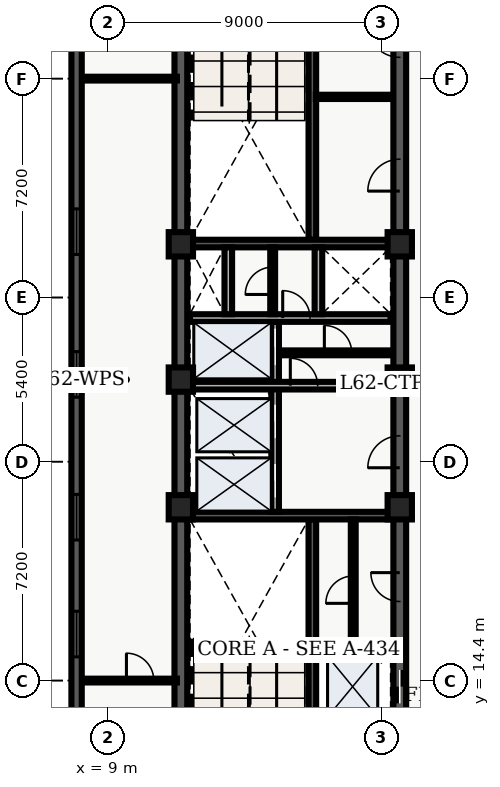
"""IFC4 building model, lengths in metres.
Left out: names, types, materials, properties, quantities, classifications, styles, units other than length and angle.
Written with IfcOpenShell. Run it as: python <this file> out.ifc"""

import sys

from ifc_helpers import new_model, entity, si_unit, converted_unit, direction, frame, origin_with_axes, origin_2d_with_axis, place, context, subcontext, project, spatial, polyline, rectangle, outline, extrude, element, fill, save


model = new_model("IFC4")
c1 = context("Model", 3, precision=1e-05, world=origin_with_axes(), true_north=direction((0.0, 1.0)))
c2 = subcontext(c1, "Body", "Model", "MODEL_VIEW")
j1 = project(units=[si_unit("LENGTHUNIT", "METRE"), converted_unit("PLANEANGLEUNIT", "DEGREE", entity("IfcPlaneAngleMeasure", 0.017), si_unit("PLANEANGLEUNIT", "RADIAN"), dimensions=[0, 0, 0, 0, 0, 0, 0])], contexts=[c1])
p1 = place(None, origin_with_axes())
s1 = spatial("IfcSite", under=j1, at=p1, CompositionType="ELEMENT")
p2 = place(p1, origin_with_axes())
s2 = spatial("IfcBuilding", under=s1, at=p2, CompositionType="ELEMENT")
p3 = place(p2, frame((0.0, 0.0, 252.9), z_axis=(0.0, 0.0, 1.0), x_axis=(1.0, 0.0, 0.0)))
s3 = spatial("IfcBuildingStorey", under=s2, at=p3, CompositionType="ELEMENT", Elevation=252.9)
p4 = place(p3, frame((11.4, 10.8, 0.0), z_axis=(0.0, 0.0, 1.0), x_axis=(0.0, 1.0, 0.0)))
e1 = element("IfcWall", 1, at=p4, inside=s3, PredefinedType="SHEAR", context=c2, shape_type="SweptSolid", body=[
    extrude(outline(polyline([(0.0, -0.21), (27.0, -0.21), (27.0, 0.21), (0.0, 0.21), (0.0, -0.21)])), origin_with_axes(), (0.0, 0.0, 1.0), 3.66),
])
p5 = place(p3, frame((18.6, 10.8, 0.0), z_axis=(0.0, 0.0, 1.0), x_axis=(0.0, 1.0, 0.0)))
e2 = element("IfcWall", 2, at=p5, inside=s3, PredefinedType="SHEAR", context=c2, shape_type="SweptSolid", body=[
    extrude(outline(polyline([(0.0, -0.21), (13.5, -0.21), (13.5, 0.21), (0.0, 0.21), (0.0, -0.21)])), origin_with_axes(), (0.0, 0.0, 1.0), 3.66),
])
p6 = place(p5, frame((1.3, 0.0, 0.0), z_axis=(0.0, 0.0, 1.0), x_axis=(1.0, 0.0, 0.0)))
e3 = element("IfcOpeningElement", 3, at=p6, cuts=e2, PredefinedType="OPENING", context=c2, shape_type="SweptSolid", body=[
    extrude(rectangle(XDim=1.1, YDim=0.44, at=origin_2d_with_axis()), origin_with_axes(), (0.0, 0.0, 1.0), 2.15),
])
p7 = place(p5, frame((3.4, 0.0, 0.0), z_axis=(0.0, 0.0, 1.0), x_axis=(1.0, 0.0, 0.0)))
e4 = element("IfcOpeningElement", 4, at=p7, cuts=e2, PredefinedType="OPENING", context=c2, shape_type="SweptSolid", body=[
    extrude(rectangle(XDim=1.1, YDim=0.44, at=origin_2d_with_axis()), origin_with_axes(), (0.0, 0.0, 1.0), 2.15),
])
p8 = place(p5, frame((11.125, 0.0, 0.0), z_axis=(0.0, 0.0, 1.0), x_axis=(1.0, 0.0, 0.0)))
e5 = element("IfcOpeningElement", 5, at=p8, cuts=e2, PredefinedType="OPENING", context=c2, shape_type="SweptSolid", body=[
    extrude(rectangle(XDim=1.05, YDim=0.44, at=origin_2d_with_axis()), origin_with_axes(), (0.0, 0.0, 1.0), 2.15),
])
p9 = place(p5, frame((6.675, 0.0, 0.0), z_axis=(0.0, 0.0, 1.0), x_axis=(1.0, 0.0, 0.0)))
e6 = element("IfcOpeningElement", 6, at=p9, cuts=e2, PredefinedType="OPENING", context=c2, shape_type="SweptSolid", body=[
    extrude(rectangle(XDim=0.95, YDim=0.44, at=origin_2d_with_axis()), origin_with_axes(), (0.0, 0.0, 1.0), 2.15),
])
p10 = place(p3, frame((18.6, 24.3, 0.0), z_axis=(0.0, 0.0, 1.0), x_axis=(0.0, 1.0, 0.0)))
e7 = element("IfcWall", 7, at=p10, inside=s3, PredefinedType="SHEAR", context=c2, shape_type="SweptSolid", body=[
    extrude(outline(polyline([(0.0, -0.21), (13.5, -0.21), (13.5, 0.21), (0.0, 0.21), (0.0, -0.21)])), origin_with_axes(), (0.0, 0.0, 1.0), 3.66),
])
p11 = place(p10, frame((6.725, 0.0, 0.0), z_axis=(0.0, 0.0, 1.0), x_axis=(1.0, 0.0, 0.0)))
e8 = element("IfcOpeningElement", 8, at=p11, cuts=e7, PredefinedType="OPENING", context=c2, shape_type="SweptSolid", body=[
    extrude(rectangle(XDim=1.05, YDim=0.44, at=origin_2d_with_axis()), origin_with_axes(), (0.0, 0.0, 1.0), 2.15),
])
p12 = place(p10, frame((11.125, 0.0, 0.0), z_axis=(0.0, 0.0, 1.0), x_axis=(1.0, 0.0, 0.0)))
e9 = element("IfcOpeningElement", 9, at=p12, cuts=e7, PredefinedType="OPENING", context=c2, shape_type="SweptSolid", body=[
    extrude(rectangle(XDim=1.05, YDim=0.44, at=origin_2d_with_axis()), origin_with_axes(), (0.0, 0.0, 1.0), 2.15),
])
p13 = place(p3, frame((15.725, 11.01, 0.0), z_axis=(0.0, 0.0, 1.0), x_axis=(0.0, 1.0, 0.0)))
e10 = element("IfcWall", 10, at=p13, inside=s3, PredefinedType="SHEAR", context=c2, shape_type="SweptSolid", body=[
    extrude(outline(polyline([(0.0, -0.125), (8.69, -0.125), (8.69, 0.125), (0.0, 0.125), (0.0, -0.125)])), origin_with_axes(), (0.0, 0.0, 1.0), 3.66),
])
p14 = place(p3, frame((11.61, 19.825, 0.0), z_axis=(0.0, 0.0, 1.0), x_axis=(1.0, 0.0, 0.0)))
e11 = element("IfcWall", 11, at=p14, inside=s3, PredefinedType="SHEAR", context=c2, shape_type="SweptSolid", body=[
    extrude(outline(polyline([(0.0, -0.125), (6.78, -0.125), (6.78, 0.125), (0.0, 0.125), (0.0, -0.125)])), origin_with_axes(), (0.0, 0.0, 1.0), 3.66),
])
p15 = place(p3, frame((15.725, 28.9, 0.0), z_axis=(0.0, 0.0, 1.0), x_axis=(0.0, 1.0, 0.0)))
e12 = element("IfcWall", 12, at=p15, inside=s3, PredefinedType="SHEAR", context=c2, shape_type="SweptSolid", body=[
    extrude(outline(polyline([(0.0, -0.125), (8.69, -0.125), (8.69, 0.125), (0.0, 0.125), (0.0, -0.125)])), origin_with_axes(), (0.0, 0.0, 1.0), 3.66),
])
p16 = place(p3, frame((11.61, 28.775, 0.0), z_axis=(0.0, 0.0, 1.0), x_axis=(1.0, 0.0, 0.0)))
e13 = element("IfcWall", 13, at=p16, inside=s3, PredefinedType="SHEAR", context=c2, shape_type="SweptSolid", body=[
    extrude(outline(polyline([(0.0, -0.125), (6.78, -0.125), (6.78, 0.125), (0.0, 0.125), (0.0, -0.125)])), origin_with_axes(), (0.0, 0.0, 1.0), 3.66),
])
p17 = place(p3, frame((14.5, 19.95, 0.0), z_axis=(0.0, 0.0, 1.0), x_axis=(0.0, 1.0, 0.0)))
e14 = element("IfcWall", 14, at=p17, inside=s3, PredefinedType="SOLIDWALL", context=c2, shape_type="SweptSolid", body=[
    extrude(outline(polyline([(0.0, -0.125), (6.25, -0.125), (6.25, 0.125), (0.0, 0.125), (0.0, -0.125)])), origin_with_axes(), (0.0, 0.0, 1.0), 2.7),
])
p18 = place(p17, frame((1.025, 0.0, 0.0), z_axis=(0.0, 0.0, 1.0), x_axis=(1.0, 0.0, 0.0)))
e15 = element("IfcOpeningElement", 15, at=p18, cuts=e14, PredefinedType="OPENING", context=c2, shape_type="SweptSolid", body=[
    extrude(rectangle(XDim=1.1, YDim=0.27, at=origin_2d_with_axis()), origin_with_axes(), (0.0, 0.0, 1.0), 2.15),
])
p19 = place(p17, frame((2.975, 0.0, 0.0), z_axis=(0.0, 0.0, 1.0), x_axis=(1.0, 0.0, 0.0)))
e16 = element("IfcOpeningElement", 16, at=p19, cuts=e14, PredefinedType="OPENING", context=c2, shape_type="SweptSolid", body=[
    extrude(rectangle(XDim=1.1, YDim=0.27, at=origin_2d_with_axis()), origin_with_axes(), (0.0, 0.0, 1.0), 2.15),
])
p20 = place(p17, frame((5.425, 0.0, 0.0), z_axis=(0.0, 0.0, 1.0), x_axis=(1.0, 0.0, 0.0)))
e17 = element("IfcOpeningElement", 17, at=p20, cuts=e14, PredefinedType="OPENING", context=c2, shape_type="SweptSolid", body=[
    extrude(rectangle(XDim=1.2, YDim=0.27, at=origin_2d_with_axis()), origin_with_axes(), (0.0, 0.0, 1.0), 2.15),
])
p21 = place(p3, frame((11.7, 24.1, 0.0), z_axis=(0.0, 0.0, 1.0), x_axis=(1.0, 0.0, 0.0)))
e18 = element("IfcWall", 18, at=p21, inside=s3, PredefinedType="SOLIDWALL", context=c2, shape_type="SweptSolid", body=[
    extrude(outline(polyline([(0.0, -0.125), (6.6, -0.125), (6.6, 0.125), (0.0, 0.125), (0.0, -0.125)])), origin_with_axes(), (0.0, 0.0, 1.0), 2.7),
])
p22 = place(p21, frame((3.75, 0.0, 0.0), z_axis=(0.0, 0.0, 1.0), x_axis=(1.0, 0.0, 0.0)))
e19 = element("IfcOpeningElement", 19, at=p22, cuts=e18, PredefinedType="OPENING", context=c2, shape_type="SweptSolid", body=[
    extrude(rectangle(XDim=0.9, YDim=0.27, at=origin_2d_with_axis()), origin_with_axes(), (0.0, 0.0, 1.0), 2.15),
])
p23 = place(p3, frame((11.7, 26.325, 0.0), z_axis=(0.0, 0.0, 1.0), x_axis=(1.0, 0.0, 0.0)))
e20 = element("IfcWall", 20, at=p23, inside=s3, PredefinedType="SOLIDWALL", context=c2, shape_type="SweptSolid", body=[
    extrude(outline(polyline([(0.0, -0.125), (6.6, -0.125), (6.6, 0.125), (0.0, 0.125), (0.0, -0.125)])), origin_with_axes(), (0.0, 0.0, 1.0), 2.7),
])
p24 = place(p23, frame((3.5, 0.0, 0.0), z_axis=(0.0, 0.0, 1.0), x_axis=(1.0, 0.0, 0.0)))
e21 = element("IfcOpeningElement", 21, at=p24, cuts=e20, PredefinedType="OPENING", context=c2, shape_type="SweptSolid", body=[
    extrude(rectangle(XDim=0.9, YDim=0.27, at=origin_2d_with_axis()), origin_with_axes(), (0.0, 0.0, 1.0), 2.15),
])
for number, where, z_axis, x_axis in (
    (22, (12.96, 26.45, 0.0), (0.0, 0.0, 1.0), (0.0, 1.0, 0.0)),
    (23, (15.925, 26.45, 0.0), (0.0, 0.0, 1.0), (0.0, 1.0, 0.0)),
):
    element("IfcWall", number, at=place(p3, frame(where, z_axis=z_axis, x_axis=x_axis)), inside=s3, PredefinedType="SOLIDWALL", context=c2, shape_type="SweptSolid", body=[
        extrude(outline(polyline([(0.0, -0.125), (2.2, -0.125), (2.2, 0.125), (0.0, 0.125), (0.0, -0.125)])), origin_with_axes(), (0.0, 0.0, 1.0), 2.7),
    ])
for number, where, z_axis, x_axis in (
    (24, (11.4, 20.1, 0.0), (0.0, 0.0, 1.0), (1.0, 0.0, 0.0)),
    (25, (11.4, 24.3, 0.0), (0.0, 0.0, 1.0), (1.0, 0.0, 0.0)),
    (26, (11.4, 28.75, 0.0), (0.0, 0.0, 1.0), (1.0, 0.0, 0.0)),
    (27, (18.6, 20.1, 0.0), (0.0, 0.0, 1.0), (1.0, 0.0, 0.0)),
    (28, (18.6, 24.3, 0.0), (0.0, 0.0, 1.0), (1.0, 0.0, 0.0)),
    (29, (18.6, 28.75, 0.0), (0.0, 0.0, 1.0), (1.0, 0.0, 0.0)),
):
    element("IfcColumn", number, at=place(p3, frame(where, z_axis=z_axis, x_axis=x_axis)), inside=s3, PredefinedType="COLUMN", context=c2, shape_type="SweptSolid", body=[
        extrude(rectangle(XDim=0.8, YDim=0.8, at=origin_2d_with_axis()), origin_with_axes(), (0.0, 0.0, 1.0), 3.9),
    ])
p25 = place(p3, frame((14.62, 25.18, 0.0), z_axis=(0.0, 0.0, 1.0), x_axis=(1.0, 0.0, 0.0)))
e30 = element("IfcWall", 30, at=p25, inside=s3, PredefinedType="PARTITIONING", context=c2, shape_type="SweptSolid", body=[
    extrude(outline(polyline([(0.0, -0.08), (3.68, -0.08), (3.68, 0.08), (0.0, 0.08), (0.0, -0.08)])), origin_with_axes(), (0.0, 0.0, 1.0), 2.7),
])
p26 = place(p25, frame((1.95, 0.0, 0.0), z_axis=(0.0, 0.0, 1.0), x_axis=(1.0, 0.0, 0.0)))
e31 = element("IfcOpeningElement", 31, at=p26, cuts=e30, PredefinedType="OPENING", context=c2, shape_type="SweptSolid", body=[
    extrude(rectangle(XDim=0.9, YDim=0.18, at=origin_2d_with_axis()), origin_with_axes(), (0.0, 0.0, 1.0), 2.15),
])
p27 = place(p3, frame((14.42, 26.45, 0.0), z_axis=(0.0, 0.0, 1.0), x_axis=(0.0, 1.0, 0.0)))
e32 = element("IfcWall", 32, at=p27, inside=s3, PredefinedType="PARTITIONING", context=c2, shape_type="SweptSolid", body=[
    extrude(outline(polyline([(0.0, -0.08), (2.2, -0.08), (2.2, 0.08), (0.0, 0.08), (0.0, -0.08)])), origin_with_axes(), (0.0, 0.0, 1.0), 2.7),
])
p28 = place(p27, frame((1.1, 0.0, 0.0), z_axis=(0.0, 0.0, 1.0), x_axis=(1.0, 0.0, 0.0)))
e33 = element("IfcOpeningElement", 33, at=p28, cuts=e32, PredefinedType="OPENING", context=c2, shape_type="SweptSolid", body=[
    extrude(rectangle(XDim=0.9, YDim=0.18, at=origin_2d_with_axis()), origin_with_axes(), (0.0, 0.0, 1.0), 2.15),
])
p29 = place(p3, frame((15.84, 15.27, 0.0), z_axis=(0.0, 0.0, 1.0), x_axis=(1.0, 0.0, 0.0)))
e34 = element("IfcWall", 34, at=p29, inside=s3, PredefinedType="SOLIDWALL", context=c2, shape_type="SweptSolid", body=[
    extrude(outline(polyline([(0.0, -0.125), (2.46, -0.125), (2.46, 0.125), (0.0, 0.125), (0.0, -0.125)])), origin_with_axes(), (0.0, 0.0, 1.0), 2.7),
])
p30 = place(p3, frame((17.07, 15.34, 0.0), z_axis=(0.0, 0.0, 1.0), x_axis=(0.0, 1.0, 0.0)))
e35 = element("IfcWall", 35, at=p30, inside=s3, PredefinedType="PARTITIONING", context=c2, shape_type="SweptSolid", body=[
    extrude(outline(polyline([(0.0, -0.08), (4.36, -0.08), (4.36, 0.08), (0.0, 0.08), (0.0, -0.08)])), origin_with_axes(), (0.0, 0.0, 1.0), 2.7),
])
p31 = place(p30, frame((2.05, 0.0, 0.0), z_axis=(0.0, 0.0, 1.0), x_axis=(1.0, 0.0, 0.0)))
e36 = element("IfcOpeningElement", 36, at=p31, cuts=e35, PredefinedType="OPENING", context=c2, shape_type="SweptSolid", body=[
    extrude(rectangle(XDim=0.9, YDim=0.18, at=origin_2d_with_axis()), origin_with_axes(), (0.0, 0.0, 1.0), 2.15),
])
p32 = place(p3, frame((15.84, 33.6, 0.0), z_axis=(0.0, 0.0, 1.0), x_axis=(1.0, 0.0, 0.0)))
e37 = element("IfcWall", 37, at=p32, inside=s3, PredefinedType="PARTITIONING", context=c2, shape_type="SweptSolid", body=[
    extrude(outline(polyline([(0.0, -0.07), (2.46, -0.07), (2.46, 0.07), (0.0, 0.07), (0.0, -0.07)])), origin_with_axes(), (0.0, 0.0, 1.0), 2.7),
])
p33 = place(p3, frame((8.135, 14.4, 0.0), z_axis=(0.0, 0.0, 1.0), x_axis=(1.0, 0.0, 0.0)))
e38 = element("IfcWall", 38, at=p33, inside=s3, PredefinedType="PARTITIONING", context=c2, shape_type="SweptSolid", body=[
    extrude(outline(polyline([(0.0, -0.062), (3.135, -0.062), (3.135, 0.062), (0.0, 0.062), (0.0, -0.062)])), origin_with_axes(), (0.0, 0.0, 1.0), 2.7),
])
p34 = place(p33, frame((1.925, 0.0, 0.0), z_axis=(0.0, 0.0, 1.0), x_axis=(1.0, 0.0, 0.0)))
e39 = element("IfcOpeningElement", 39, at=p34, cuts=e38, PredefinedType="OPENING", context=c2, shape_type="SweptSolid", body=[
    extrude(rectangle(XDim=0.9, YDim=0.145, at=origin_2d_with_axis()), origin_with_axes(), (0.0, 0.0, 1.0), 2.15),
])
p35 = place(p3, frame((8.135, 34.2, 0.0), z_axis=(0.0, 0.0, 1.0), x_axis=(1.0, 0.0, 0.0)))
e40 = element("IfcWall", 40, at=p35, inside=s3, PredefinedType="PARTITIONING", context=c2, shape_type="SweptSolid", body=[
    extrude(outline(polyline([(0.0, -0.062), (3.135, -0.062), (3.135, 0.062), (0.0, 0.062), (0.0, -0.062)])), origin_with_axes(), (0.0, 0.0, 1.0), 2.7),
])
p36 = place(p3, frame((7.97, 2.74, 0.0), z_axis=(0.0, 0.0, 1.0), x_axis=(0.0, 1.0, 0.0)))
e41 = element("IfcWall", 41, at=p36, inside=s3, PredefinedType="SOLIDWALL", context=c2, shape_type="SweptSolid", body=[
    extrude(outline(polyline([(0.0, -0.17), (43.46, -0.17), (43.46, 0.17), (0.0, 0.17), (0.0, -0.17)])), origin_with_axes(), (0.0, 0.0, 1.0), 3.66),
])
p37 = place(p36, frame((2.948, 0.0, 0.45), z_axis=(0.0, 0.0, 1.0), x_axis=(1.0, 0.0, 0.0)))
e42 = element("IfcOpeningElement", 42, at=p37, cuts=e41, PredefinedType="OPENING", context=c2, shape_type="SweptSolid", body=[
    extrude(rectangle(XDim=1.5, YDim=0.36, at=origin_2d_with_axis()), origin_with_axes(), (0.0, 0.0, 1.0), 2.1),
])
p38 = place(p36, frame((7.643, 0.0, 0.45), z_axis=(0.0, 0.0, 1.0), x_axis=(1.0, 0.0, 0.0)))
e43 = element("IfcOpeningElement", 43, at=p38, cuts=e41, PredefinedType="OPENING", context=c2, shape_type="SweptSolid", body=[
    extrude(rectangle(XDim=1.5, YDim=0.36, at=origin_2d_with_axis()), origin_with_axes(), (0.0, 0.0, 1.0), 2.1),
])
p39 = place(p36, frame((13.189, 0.0, 0.45), z_axis=(0.0, 0.0, 1.0), x_axis=(1.0, 0.0, 0.0)))
e44 = element("IfcOpeningElement", 44, at=p39, cuts=e41, PredefinedType="OPENING", context=c2, shape_type="SweptSolid", body=[
    extrude(rectangle(XDim=1.5, YDim=0.36, at=origin_2d_with_axis()), origin_with_axes(), (0.0, 0.0, 1.0), 2.1),
])
p40 = place(p36, frame((17.034, 0.0, 0.45), z_axis=(0.0, 0.0, 1.0), x_axis=(1.0, 0.0, 0.0)))
e45 = element("IfcOpeningElement", 45, at=p40, cuts=e41, PredefinedType="OPENING", context=c2, shape_type="SweptSolid", body=[
    extrude(rectangle(XDim=1.5, YDim=0.36, at=origin_2d_with_axis()), origin_with_axes(), (0.0, 0.0, 1.0), 2.1),
])
p41 = place(p36, frame((21.73, 0.0, 0.45), z_axis=(0.0, 0.0, 1.0), x_axis=(1.0, 0.0, 0.0)))
e46 = element("IfcOpeningElement", 46, at=p41, cuts=e41, PredefinedType="OPENING", context=c2, shape_type="SweptSolid", body=[
    extrude(rectangle(XDim=1.5, YDim=0.36, at=origin_2d_with_axis()), origin_with_axes(), (0.0, 0.0, 1.0), 2.1),
])
p42 = place(p36, frame((26.426, 0.0, 0.45), z_axis=(0.0, 0.0, 1.0), x_axis=(1.0, 0.0, 0.0)))
e47 = element("IfcOpeningElement", 47, at=p42, cuts=e41, PredefinedType="OPENING", context=c2, shape_type="SweptSolid", body=[
    extrude(rectangle(XDim=1.5, YDim=0.36, at=origin_2d_with_axis()), origin_with_axes(), (0.0, 0.0, 1.0), 2.1),
])
p43 = place(p36, frame((35.817, 0.0, 0.45), z_axis=(0.0, 0.0, 1.0), x_axis=(1.0, 0.0, 0.0)))
e48 = element("IfcOpeningElement", 48, at=p43, cuts=e41, PredefinedType="OPENING", context=c2, shape_type="SweptSolid", body=[
    extrude(rectangle(XDim=1.5, YDim=0.36, at=origin_2d_with_axis()), origin_with_axes(), (0.0, 0.0, 1.0), 2.1),
])
p44 = place(p36, frame((40.512, 0.0, 0.45), z_axis=(0.0, 0.0, 1.0), x_axis=(1.0, 0.0, 0.0)))
e49 = element("IfcOpeningElement", 49, at=p44, cuts=e41, PredefinedType="OPENING", context=c2, shape_type="SweptSolid", body=[
    extrude(rectangle(XDim=1.5, YDim=0.36, at=origin_2d_with_axis()), origin_with_axes(), (0.0, 0.0, 1.0), 2.1),
])
p45 = place(p5, frame((3.4, 0.0, 0.0), z_axis=(0.0, 0.0, 1.0), x_axis=(1.0, 0.0, 0.0)))
e50 = element("IfcDoor", 50, at=p45, inside=s3, OperationType="SLIDING_TO_RIGHT", PredefinedType="DOOR", context=c2, shape_type="SweptSolid", body=[
    extrude(rectangle(XDim=1.1, YDim=0.09, at=origin_2d_with_axis()), origin_with_axes(), (0.0, 0.0, 1.0), 2.15),
])
fill(e4, e50)
p46 = place(p17, frame((1.025, 0.0, 0.0), z_axis=(0.0, 0.0, 1.0), x_axis=(1.0, 0.0, 0.0)))
e51 = element("IfcDoor", 51, at=p46, inside=s3, OperationType="SLIDING_TO_LEFT", PredefinedType="DOOR", context=c2, shape_type="SweptSolid", body=[
    extrude(rectangle(XDim=1.1, YDim=0.09, at=origin_2d_with_axis()), origin_with_axes(), (0.0, 0.0, 1.0), 2.15),
])
fill(e15, e51)
p47 = place(p17, frame((2.975, 0.0, 0.0), z_axis=(0.0, 0.0, 1.0), x_axis=(1.0, 0.0, 0.0)))
e52 = element("IfcDoor", 52, at=p47, inside=s3, OperationType="SLIDING_TO_RIGHT", PredefinedType="DOOR", context=c2, shape_type="SweptSolid", body=[
    extrude(rectangle(XDim=1.1, YDim=0.09, at=origin_2d_with_axis()), origin_with_axes(), (0.0, 0.0, 1.0), 2.15),
])
fill(e16, e52)
p48 = place(p17, frame((5.425, 0.0, 0.0), z_axis=(0.0, 0.0, 1.0), x_axis=(1.0, 0.0, 0.0)))
e53 = element("IfcDoor", 53, at=p48, inside=s3, OperationType="DOUBLE_DOOR_SLIDING", PredefinedType="DOOR", context=c2, shape_type="SweptSolid", body=[
    extrude(rectangle(XDim=1.2, YDim=0.09, at=origin_2d_with_axis()), origin_with_axes(), (0.0, 0.0, 1.0), 2.15),
])
fill(e17, e53)
p49 = place(p5, frame((11.125, 0.0, 0.0), z_axis=(0.0, 0.0, 1.0), x_axis=(1.0, 0.0, 0.0)))
e54 = element("IfcDoor", 54, at=p49, inside=s3, OperationType="SINGLE_SWING_LEFT", PredefinedType="DOOR", context=c2, shape_type="SweptSolid", body=[
    extrude(rectangle(XDim=1.05, YDim=0.09, at=origin_2d_with_axis()), origin_with_axes(), (0.0, 0.0, 1.0), 2.15),
])
fill(e5, e54)
p50 = place(p23, frame((3.5, 0.0, 0.0), z_axis=(0.0, 0.0, 1.0), x_axis=(1.0, 0.0, 0.0)))
e55 = element("IfcDoor", 55, at=p50, inside=s3, OperationType="SINGLE_SWING_LEFT", PredefinedType="DOOR", context=c2, shape_type="SweptSolid", body=[
    extrude(rectangle(XDim=0.9, YDim=0.09, at=origin_2d_with_axis()), origin_with_axes(), (0.0, 0.0, 1.0), 2.15),
])
fill(e21, e55)
p51 = place(p27, frame((1.1, 0.0, 0.0), z_axis=(0.0, 0.0, 1.0), x_axis=(1.0, 0.0, 0.0)))
e56 = element("IfcDoor", 56, at=p51, inside=s3, OperationType="SINGLE_SWING_LEFT", PredefinedType="DOOR", context=c2, shape_type="SweptSolid", body=[
    extrude(rectangle(XDim=0.9, YDim=0.09, at=origin_2d_with_axis()), origin_with_axes(), (0.0, 0.0, 1.0), 2.15),
])
fill(e33, e56)
p52 = place(p21, frame((3.75, 0.0, 0.0), z_axis=(0.0, 0.0, 1.0), x_axis=(1.0, 0.0, 0.0)))
e57 = element("IfcDoor", 57, at=p52, inside=s3, OperationType="SINGLE_SWING_LEFT", PredefinedType="DOOR", context=c2, shape_type="SweptSolid", body=[
    extrude(rectangle(XDim=0.9, YDim=0.09, at=origin_2d_with_axis()), origin_with_axes(), (0.0, 0.0, 1.0), 2.15),
])
fill(e19, e57)
p53 = place(p25, frame((1.95, 0.0, 0.0), z_axis=(0.0, 0.0, 1.0), x_axis=(1.0, 0.0, 0.0)))
e58 = element("IfcDoor", 58, at=p53, inside=s3, OperationType="SINGLE_SWING_LEFT", PredefinedType="DOOR", context=c2, shape_type="SweptSolid", body=[
    extrude(rectangle(XDim=0.9, YDim=0.09, at=origin_2d_with_axis()), origin_with_axes(), (0.0, 0.0, 1.0), 2.15),
])
fill(e31, e58)
p54 = place(p30, frame((2.05, 0.0, 0.0), z_axis=(0.0, 0.0, 1.0), x_axis=(1.0, 0.0, 0.0)))
e59 = element("IfcDoor", 59, at=p54, inside=s3, OperationType="SINGLE_SWING_LEFT", PredefinedType="DOOR", context=c2, shape_type="SweptSolid", body=[
    extrude(rectangle(XDim=0.9, YDim=0.09, at=origin_2d_with_axis()), origin_with_axes(), (0.0, 0.0, 1.0), 2.15),
])
fill(e36, e59)
p55 = place(p5, frame((6.675, 0.0, 0.0), z_axis=(0.0, 0.0, 1.0), x_axis=(1.0, 0.0, 0.0)))
e60 = element("IfcDoor", 60, at=p55, inside=s3, OperationType="SINGLE_SWING_RIGHT", PredefinedType="DOOR", context=c2, shape_type="SweptSolid", body=[
    extrude(rectangle(XDim=0.95, YDim=0.09, at=origin_2d_with_axis()), origin_with_axes(), (0.0, 0.0, 1.0), 2.15),
])
fill(e6, e60)
p56 = place(p10, frame((6.725, 0.0, 0.0), z_axis=(0.0, 0.0, 1.0), x_axis=(1.0, 0.0, 0.0)))
e61 = element("IfcDoor", 61, at=p56, inside=s3, OperationType="SINGLE_SWING_LEFT", PredefinedType="DOOR", context=c2, shape_type="SweptSolid", body=[
    extrude(rectangle(XDim=1.05, YDim=0.09, at=origin_2d_with_axis()), origin_with_axes(), (0.0, 0.0, 1.0), 2.15),
])
fill(e8, e61)
p57 = place(p10, frame((11.125, 0.0, 0.0), z_axis=(0.0, 0.0, 1.0), x_axis=(1.0, 0.0, 0.0)))
e62 = element("IfcDoor", 62, at=p57, inside=s3, OperationType="SINGLE_SWING_RIGHT", PredefinedType="DOOR", context=c2, shape_type="SweptSolid", body=[
    extrude(rectangle(XDim=1.05, YDim=0.09, at=origin_2d_with_axis()), origin_with_axes(), (0.0, 0.0, 1.0), 2.15),
])
fill(e9, e62)
p58 = place(p33, frame((1.925, 0.0, 0.0), z_axis=(0.0, 0.0, 1.0), x_axis=(1.0, 0.0, 0.0)))
e63 = element("IfcDoor", 63, at=p58, inside=s3, OperationType="SINGLE_SWING_LEFT", PredefinedType="DOOR", context=c2, shape_type="SweptSolid", body=[
    extrude(rectangle(XDim=0.9, YDim=0.075, at=origin_2d_with_axis()), origin_with_axes(), (0.0, 0.0, 1.0), 2.15),
])
fill(e39, e63)
p59 = place(p36, frame((13.189, 0.0, 0.45), z_axis=(0.0, 0.0, 1.0), x_axis=(1.0, 0.0, 0.0)))
e64 = element("IfcWindow", 64, at=p59, inside=s3, PredefinedType="WINDOW", context=c2, shape_type="SweptSolid", body=[
    extrude(rectangle(XDim=1.5, YDim=0.09, at=origin_2d_with_axis()), origin_with_axes(), (0.0, 0.0, 1.0), 2.1),
])
fill(e44, e64)
p60 = place(p36, frame((17.034, 0.0, 0.45), z_axis=(0.0, 0.0, 1.0), x_axis=(1.0, 0.0, 0.0)))
e65 = element("IfcWindow", 65, at=p60, inside=s3, PredefinedType="WINDOW", context=c2, shape_type="SweptSolid", body=[
    extrude(rectangle(XDim=1.5, YDim=0.09, at=origin_2d_with_axis()), origin_with_axes(), (0.0, 0.0, 1.0), 2.1),
])
fill(e45, e65)
p61 = place(p36, frame((21.73, 0.0, 0.45), z_axis=(0.0, 0.0, 1.0), x_axis=(1.0, 0.0, 0.0)))
e66 = element("IfcWindow", 66, at=p61, inside=s3, PredefinedType="WINDOW", context=c2, shape_type="SweptSolid", body=[
    extrude(rectangle(XDim=1.5, YDim=0.09, at=origin_2d_with_axis()), origin_with_axes(), (0.0, 0.0, 1.0), 2.1),
])
fill(e46, e66)
p62 = place(p36, frame((26.426, 0.0, 0.45), z_axis=(0.0, 0.0, 1.0), x_axis=(1.0, 0.0, 0.0)))
e67 = element("IfcWindow", 67, at=p62, inside=s3, PredefinedType="WINDOW", context=c2, shape_type="SweptSolid", body=[
    extrude(rectangle(XDim=1.5, YDim=0.09, at=origin_2d_with_axis()), origin_with_axes(), (0.0, 0.0, 1.0), 2.1),
])
fill(e47, e67)
save(model, sys.argv[1])
